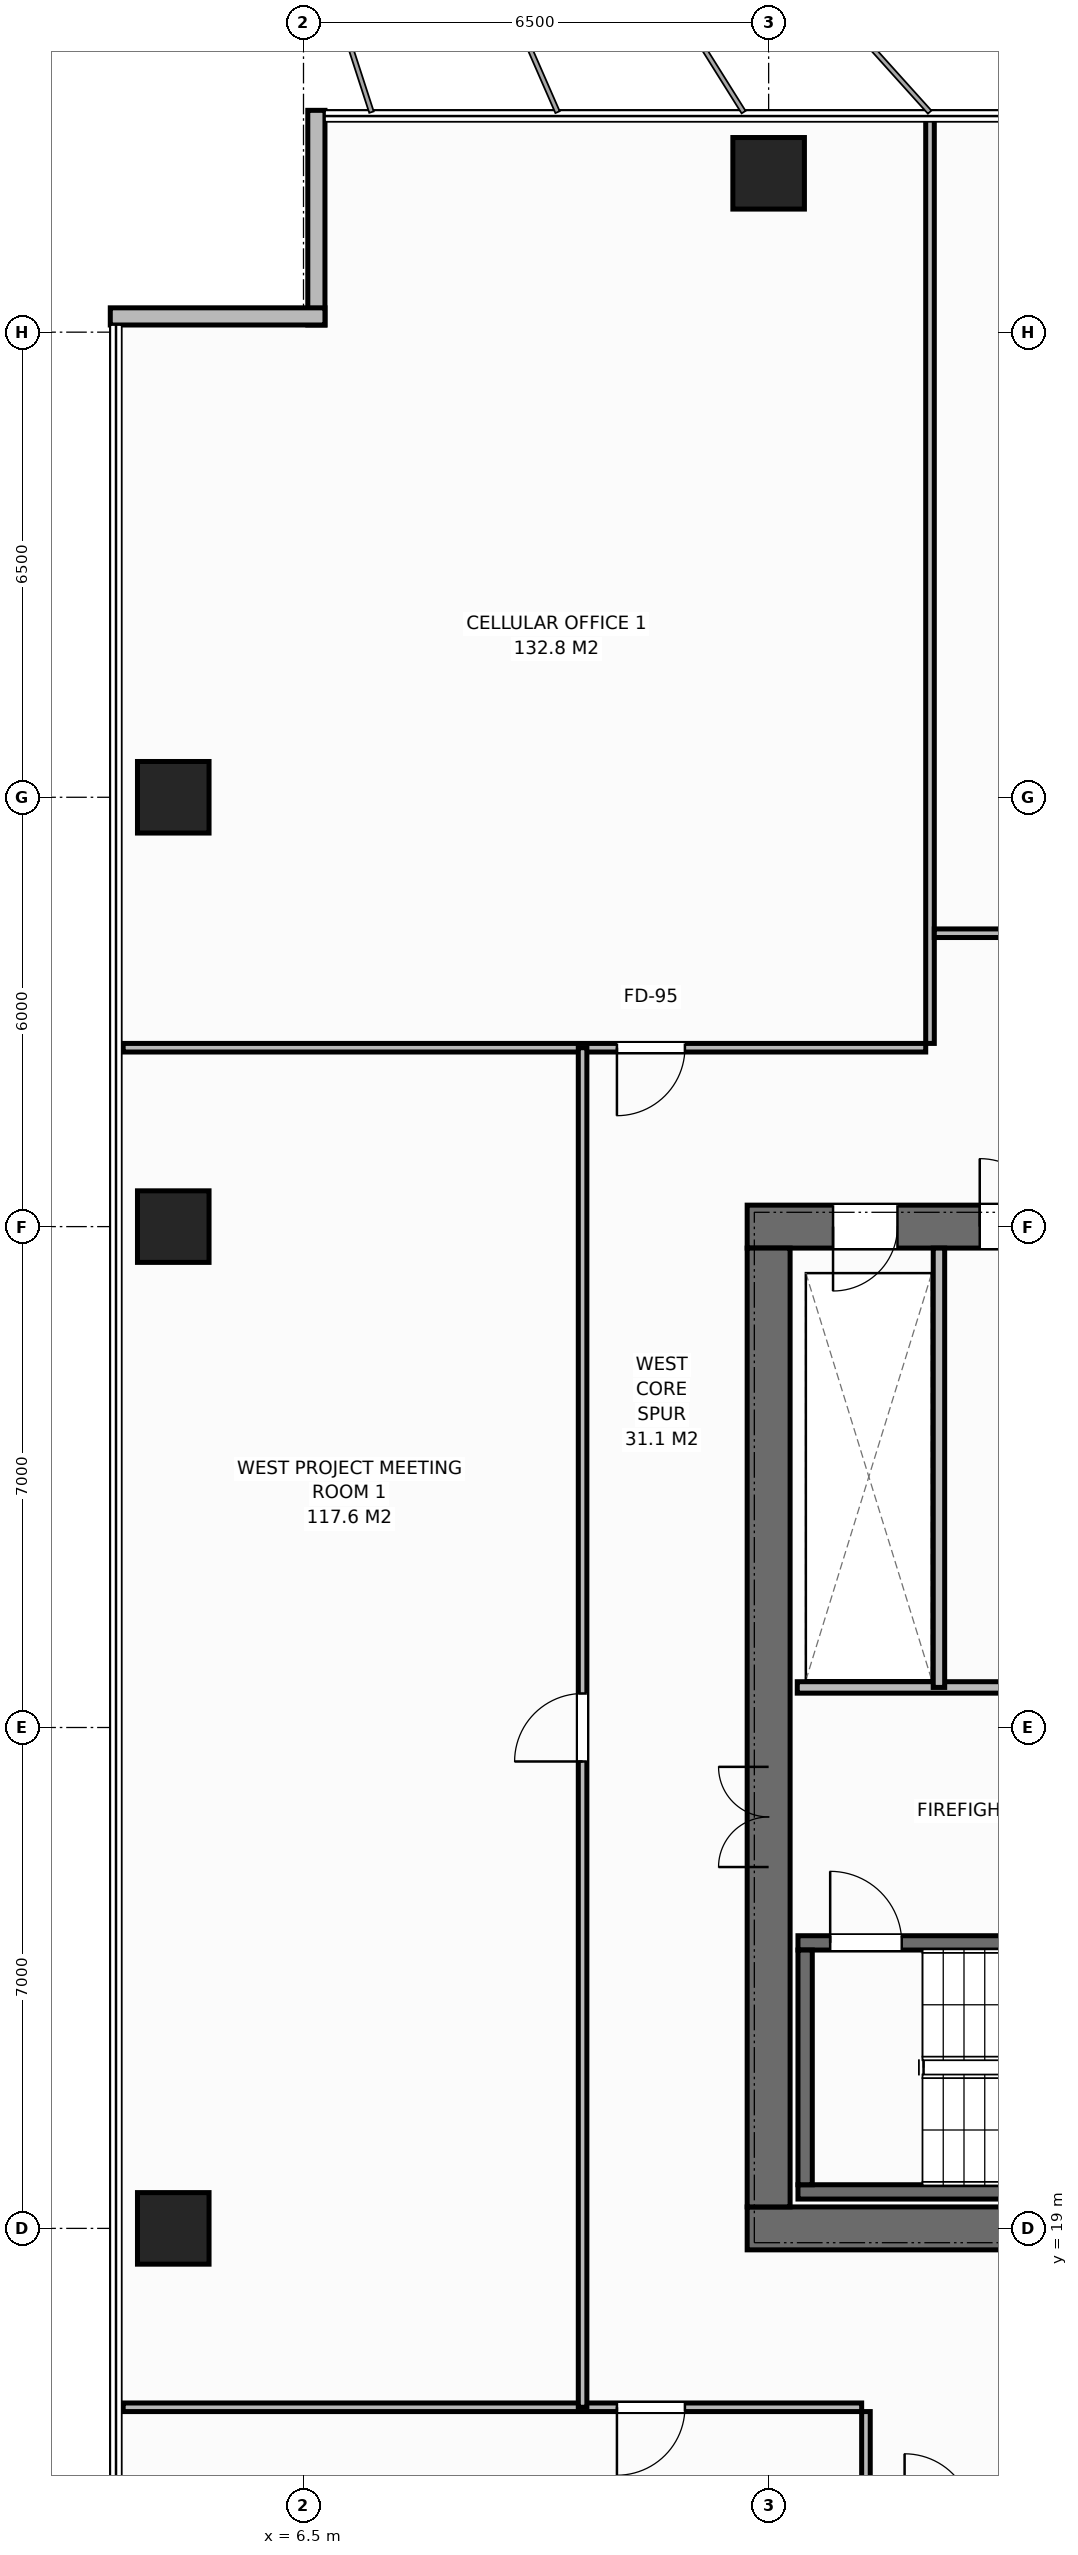
"""IFC4 building model, lengths in metres.
Left out: names, types, materials, properties, quantities, classifications, styles, units other than length and angle.
Written with IfcOpenShell. Run it as: python <this file> out.ifc"""

import sys

from ifc_helpers import new_model, si_unit, direction, frame, frame_2d, origin, origin_2d, place, context, subcontext, project, spatial, rectangle, extrude, element, fill, save


model = new_model("IFC4")
c1 = context("Model", 3, precision=1e-05, world=origin(), true_north=direction((0.0, 1.0)))
c2 = subcontext(c1, "Body", "Model", "MODEL_VIEW")
j1 = project(units=[si_unit("LENGTHUNIT", "METRE"), si_unit("PLANEANGLEUNIT", "RADIAN")], contexts=[c1])
p1 = place(None, origin())
s1 = spatial("IfcSite", under=j1, at=p1, CompositionType="ELEMENT")
p2 = place(p1, origin())
s2 = spatial("IfcBuilding", under=s1, at=p2, CompositionType="ELEMENT")
p3 = place(p2, frame((0.0, 0.0, 170.8)))
s3 = spatial("IfcBuildingStorey", under=s2, at=p3, CompositionType="ELEMENT", Elevation=170.8)
p4 = place(p3, frame((12.7, 19.0, 0.0), z_axis=(0.0, 0.0, 1.0), x_axis=(1.0, 0.0, 0.0)))
e1 = element("IfcWall", 1, at=p4, inside=s3, PredefinedType="SHEAR", context=c2, shape_type="SweptSolid", body=[
    extrude(rectangle(XDim=13.6, YDim=0.6, at=frame_2d((6.8, 0.0))), origin(), (0.0, 0.0, 1.0), 3.8),
])
p5 = place(p4, frame((9.18, 0.0, 0.0)))
e2 = element("IfcOpeningElement", 2, at=p5, cuts=e1, PredefinedType="OPENING", context=c2, shape_type="SweptSolid", body=[
    extrude(rectangle(XDim=1.4, YDim=2.2, at=frame_2d((0.7, 1.1))), frame((0.0, 0.31, 0.0), z_axis=(0.0, -1.0, 0.0), x_axis=(1.0, 0.0, 0.0)), (0.0, 0.0, 1.0), 0.62),
])
p6 = place(p3, frame((12.7, 33.0, 0.0), z_axis=(0.0, 0.0, 1.0), x_axis=(1.0, 0.0, 0.0)))
e3 = element("IfcWall", 3, at=p6, inside=s3, PredefinedType="SHEAR", context=c2, shape_type="SweptSolid", body=[
    extrude(rectangle(XDim=13.6, YDim=0.6, at=frame_2d((6.8, 0.0))), origin(), (0.0, 0.0, 1.0), 3.8),
])
p7 = place(p6, frame((1.2, 0.0, 0.0)))
e4 = element("IfcOpeningElement", 4, at=p7, cuts=e3, PredefinedType="OPENING", context=c2, shape_type="SweptSolid", body=[
    extrude(rectangle(XDim=0.9, YDim=2.15, at=frame_2d((0.45, 1.075))), frame((0.0, 0.31, 0.0), z_axis=(0.0, -1.0, 0.0), x_axis=(1.0, 0.0, 0.0)), (0.0, 0.0, 1.0), 0.62),
])
p8 = place(p6, frame((3.25, 0.0, 0.0)))
e5 = element("IfcOpeningElement", 5, at=p8, cuts=e3, PredefinedType="OPENING", context=c2, shape_type="SweptSolid", body=[
    extrude(rectangle(XDim=0.95, YDim=2.15, at=frame_2d((0.475, 1.075))), frame((0.0, 0.31, 0.0), z_axis=(0.0, -1.0, 0.0), x_axis=(1.0, 0.0, 0.0)), (0.0, 0.0, 1.0), 0.62),
])
p9 = place(p6, frame((6.1, 0.0, 0.0)))
e6 = element("IfcOpeningElement", 6, at=p9, cuts=e3, PredefinedType="OPENING", context=c2, shape_type="SweptSolid", body=[
    extrude(rectangle(XDim=0.95, YDim=2.15, at=frame_2d((0.475, 1.075))), frame((0.0, 0.31, 0.0), z_axis=(0.0, -1.0, 0.0), x_axis=(1.0, 0.0, 0.0)), (0.0, 0.0, 1.0), 0.62),
])
p10 = place(p6, frame((9.18, 0.0, 0.0)))
e7 = element("IfcOpeningElement", 7, at=p10, cuts=e3, PredefinedType="OPENING", context=c2, shape_type="SweptSolid", body=[
    extrude(rectangle(XDim=1.4, YDim=2.2, at=frame_2d((0.7, 1.1))), frame((0.0, 0.31, 0.0), z_axis=(0.0, -1.0, 0.0), x_axis=(1.0, 0.0, 0.0)), (0.0, 0.0, 1.0), 0.62),
])
p11 = place(p3, frame((13.0, 19.3, 0.0), z_axis=(0.0, 0.0, 1.0), x_axis=(0.0, 1.0, 0.0)))
e8 = element("IfcWall", 8, at=p11, inside=s3, PredefinedType="SHEAR", context=c2, shape_type="SweptSolid", body=[
    extrude(rectangle(XDim=13.4, YDim=0.6, at=frame_2d((6.7, 0.0))), origin(), (0.0, 0.0, 1.0), 3.8),
])
p12 = place(p11, frame((4.75, 0.0, 0.0)))
e9 = element("IfcOpeningElement", 9, at=p12, cuts=e8, PredefinedType="OPENING", context=c2, shape_type="SweptSolid", body=[
    extrude(rectangle(XDim=1.4, YDim=2.2, at=frame_2d((0.7, 1.1))), frame((0.0, 0.31, 0.0), z_axis=(0.0, -1.0, 0.0), x_axis=(1.0, 0.0, 0.0)), (0.0, 0.0, 1.0), 0.62),
])
p13 = place(p3, frame((13.41, 19.51, 0.0), z_axis=(0.0, 0.0, 1.0), x_axis=(1.0, 0.0, 0.0)))
e10 = element("IfcWall", 10, at=p13, inside=s3, PredefinedType="SHEAR", context=c2, shape_type="SweptSolid", body=[
    extrude(rectangle(XDim=8.43, YDim=0.2, at=frame_2d((4.215, 0.0))), origin(), (0.0, 0.0, 1.0), 3.8),
])
p14 = place(p3, frame((13.41, 22.99, 0.0), z_axis=(0.0, 0.0, 1.0), x_axis=(1.0, 0.0, 0.0)))
e11 = element("IfcWall", 11, at=p14, inside=s3, PredefinedType="SHEAR", context=c2, shape_type="SweptSolid", body=[
    extrude(rectangle(XDim=8.43, YDim=0.2, at=frame_2d((4.215, 0.0))), origin(), (0.0, 0.0, 1.0), 3.8),
])
p15 = place(p14, frame((0.45, 0.0, 0.0)))
e12 = element("IfcOpeningElement", 12, at=p15, cuts=e11, PredefinedType="OPENING", context=c2, shape_type="SweptSolid", body=[
    extrude(rectangle(XDim=1.0, YDim=2.15, at=frame_2d((0.5, 1.075))), frame((0.0, 0.11, 0.0), z_axis=(0.0, -1.0, 0.0), x_axis=(1.0, 0.0, 0.0)), (0.0, 0.0, 1.0), 0.22),
])
p16 = place(p3, frame((13.51, 19.61, 0.0), z_axis=(0.0, 0.0, 1.0), x_axis=(0.0, 1.0, 0.0)))
e13 = element("IfcWall", 13, at=p16, inside=s3, PredefinedType="SHEAR", context=c2, shape_type="SweptSolid", body=[
    extrude(rectangle(XDim=3.28, YDim=0.2, at=frame_2d((1.64, 0.0))), origin(), (0.0, 0.0, 1.0), 3.8),
])
for number, where, z_axis, x_axis in (
    (14, (13.0, 47.72, 0.0), (0.0, 0.0, 1.0), (1.0, 0.0, 0.0)),
    (15, (4.68, 19.0, 0.0), (0.0, 0.0, 1.0), (1.0, 0.0, 0.0)),
    (16, (4.68, 33.0, 0.0), (0.0, 0.0, 1.0), (1.0, 0.0, 0.0)),
    (17, (4.68, 39.0, 0.0), (0.0, 0.0, 1.0), (1.0, 0.0, 0.0)),
):
    element("IfcColumn", number, at=place(p3, frame(where, z_axis=z_axis, x_axis=x_axis)), inside=s3, PredefinedType="COLUMN", context=c2, shape_type="SweptSolid", body=[
        extrude(rectangle(XDim=1.0, YDim=1.0, at=origin_2d()), origin(), (0.0, 0.0, 1.0), 3.8),
    ])
for number, where, z_axis, x_axis in (
    (18, (6.68, 45.6, 0.0), (0.0, 0.0, 1.0), (0.0, 1.0, 0.0)),
    (19, (3.8, 45.72, 0.0), (0.0, 0.0, 1.0), (1.0, 0.0, 0.0)),
):
    element("IfcWall", number, at=place(p3, frame(where, z_axis=z_axis, x_axis=x_axis)), inside=s3, PredefinedType="STANDARD", context=c2, shape_type="SweptSolid", body=[
        extrude(rectangle(XDim=3.0, YDim=0.24, at=frame_2d((1.5, 0.0))), origin(), (0.0, 0.0, 1.0), 3.572),
    ])
p17 = place(p3, frame((13.4, 26.56, 0.0), z_axis=(0.0, 0.0, 1.0), x_axis=(1.0, 0.0, 0.0)))
e20 = element("IfcWall", 20, at=p17, inside=s3, PredefinedType="STANDARD", context=c2, shape_type="SweptSolid", body=[
    extrude(rectangle(XDim=8.34, YDim=0.16, at=frame_2d((4.17, 0.0))), origin(), (0.0, 0.0, 1.0), 3.572),
])
p18 = place(p3, frame((15.38, 26.56, 0.0), z_axis=(0.0, 0.0, 1.0), x_axis=(0.0, 1.0, 0.0)))
e21 = element("IfcWall", 21, at=p18, inside=s3, PredefinedType="STANDARD", context=c2, shape_type="SweptSolid", body=[
    extrude(rectangle(XDim=6.14, YDim=0.16, at=frame_2d((3.07, 0.0))), origin(), (0.0, 0.0, 1.0), 3.572),
])
p19 = place(p3, frame((15.255, 35.56, 0.0), z_axis=(0.0, 0.0, 1.0), x_axis=(0.0, 1.0, 0.0)))
e22 = element("IfcWall", 22, at=p19, inside=s3, PredefinedType="PARTITIONING", context=c2, shape_type="SweptSolid", body=[
    extrude(rectangle(XDim=13.02, YDim=0.12, at=frame_2d((6.51, 0.0))), origin(), (0.0, 0.0, 1.0), 3.572),
])
p20 = place(p3, frame((3.98, 35.5, 0.0), z_axis=(0.0, 0.0, 1.0), x_axis=(1.0, 0.0, 0.0)))
e23 = element("IfcWall", 23, at=p20, inside=s3, PredefinedType="PARTITIONING", context=c2, shape_type="SweptSolid", body=[
    extrude(rectangle(XDim=11.215, YDim=0.12, at=frame_2d((5.607, 0.0))), origin(), (0.0, 0.0, 1.0), 3.572),
])
p21 = place(p20, frame((6.9, 0.0, 0.0)))
e24 = element("IfcOpeningElement", 24, at=p21, cuts=e23, PredefinedType="OPENING", context=c2, shape_type="SweptSolid", body=[
    extrude(rectangle(XDim=0.95, YDim=2.15, at=frame_2d((0.475, 1.075))), frame((0.0, 0.07, 0.0), z_axis=(0.0, -1.0, 0.0), x_axis=(1.0, 0.0, 0.0)), (0.0, 0.0, 1.0), 0.14),
])
p22 = place(p3, frame((15.315, 37.1, 0.0), z_axis=(0.0, 0.0, 1.0), x_axis=(1.0, 0.0, 0.0)))
e25 = element("IfcWall", 25, at=p22, inside=s3, PredefinedType="PARTITIONING", context=c2, shape_type="SweptSolid", body=[
    extrude(rectangle(XDim=11.294, YDim=0.12, at=frame_2d((5.647, 0.0))), origin(), (0.0, 0.0, 1.0), 3.572),
])
p23 = place(p22, frame((5.172, 0.0, 0.0)))
e26 = element("IfcOpeningElement", 26, at=p23, cuts=e25, PredefinedType="OPENING", context=c2, shape_type="SweptSolid", body=[
    extrude(rectangle(XDim=0.95, YDim=2.15, at=frame_2d((0.475, 1.075))), frame((0.0, 0.07, 0.0), z_axis=(0.0, -1.0, 0.0), x_axis=(1.0, 0.0, 0.0)), (0.0, 0.0, 1.0), 0.14),
])
p24 = place(p3, frame((14.36, 3.42, 0.0), z_axis=(0.0, 0.0, 1.0), x_axis=(0.0, 1.0, 0.0)))
e27 = element("IfcWall", 27, at=p24, inside=s3, PredefinedType="PARTITIONING", context=c2, shape_type="SweptSolid", body=[
    extrude(rectangle(XDim=13.02, YDim=0.12, at=frame_2d((6.51, 0.0))), origin(), (0.0, 0.0, 1.0), 3.572),
])
p25 = place(p3, frame((3.98, 16.5, 0.0), z_axis=(0.0, 0.0, 1.0), x_axis=(1.0, 0.0, 0.0)))
e28 = element("IfcWall", 28, at=p25, inside=s3, PredefinedType="PARTITIONING", context=c2, shape_type="SweptSolid", body=[
    extrude(rectangle(XDim=10.32, YDim=0.12, at=frame_2d((5.16, 0.0))), origin(), (0.0, 0.0, 1.0), 3.572),
])
p26 = place(p25, frame((6.9, 0.0, 0.0)))
e29 = element("IfcOpeningElement", 29, at=p26, cuts=e28, PredefinedType="OPENING", context=c2, shape_type="SweptSolid", body=[
    extrude(rectangle(XDim=0.95, YDim=2.15, at=frame_2d((0.475, 1.075))), frame((0.0, 0.07, 0.0), z_axis=(0.0, -1.0, 0.0), x_axis=(1.0, 0.0, 0.0)), (0.0, 0.0, 1.0), 0.14),
])
p27 = place(p3, frame((10.4, 16.5, 0.0), z_axis=(0.0, 0.0, 1.0), x_axis=(0.0, 1.0, 0.0)))
e30 = element("IfcWall", 30, at=p27, inside=s3, PredefinedType="PARTITIONING", context=c2, shape_type="SweptSolid", body=[
    extrude(rectangle(XDim=19.0, YDim=0.12, at=frame_2d((9.5, 0.0))), origin(), (0.0, 0.0, 1.0), 3.572),
])
p28 = place(p27, frame((9.025, 0.0, 0.0)))
e31 = element("IfcOpeningElement", 31, at=p28, cuts=e30, PredefinedType="OPENING", context=c2, shape_type="SweptSolid", body=[
    extrude(rectangle(XDim=0.95, YDim=2.15, at=frame_2d((0.475, 1.075))), frame((0.0, 0.07, 0.0), z_axis=(0.0, -1.0, 0.0), x_axis=(1.0, 0.0, 0.0)), (0.0, 0.0, 1.0), 0.14),
])
p29 = place(p15, origin())
e32 = element("IfcDoor", 32, at=p29, inside=s3, OperationType="SINGLE_SWING_LEFT", PredefinedType="DOOR", context=c2, shape_type="SweptSolid", body=[
    extrude(rectangle(XDim=1.0, YDim=2.15, at=frame_2d((0.5, 1.075))), frame((0.0, 0.025, 0.0), z_axis=(0.0, -1.0, 0.0), x_axis=(1.0, 0.0, 0.0)), (0.0, 0.0, 1.0), 0.05),
])
fill(e12, e32)
p30 = place(p12, origin())
e33 = element("IfcDoor", 33, at=p30, inside=s3, OperationType="DOUBLE_DOOR_SINGLE_SWING", PredefinedType="DOOR", context=c2, shape_type="SweptSolid", body=[
    extrude(rectangle(XDim=1.4, YDim=2.2, at=frame_2d((0.7, 1.1))), frame((0.0, 0.025, 0.0), z_axis=(0.0, -1.0, 0.0), x_axis=(1.0, 0.0, 0.0)), (0.0, 0.0, 1.0), 0.05),
])
fill(e9, e33)
p31 = place(p7, origin())
e34 = element("IfcDoor", 34, at=p31, inside=s3, OperationType="SINGLE_SWING_RIGHT", PredefinedType="DOOR", context=c2, shape_type="SweptSolid", body=[
    extrude(rectangle(XDim=0.9, YDim=2.15, at=frame_2d((0.45, 1.075))), frame((0.0, -0.025, 0.0), z_axis=(0.0, -1.0, 0.0), x_axis=(1.0, 0.0, 0.0)), (0.0, 0.0, 1.0), 0.05),
])
fill(e4, e34)
p32 = place(p8, origin())
e35 = element("IfcDoor", 35, at=p32, inside=s3, OperationType="SINGLE_SWING_LEFT", PredefinedType="DOOR", context=c2, shape_type="SweptSolid", body=[
    extrude(rectangle(XDim=0.95, YDim=2.15, at=frame_2d((0.475, 1.075))), frame((0.0, -0.025, 0.0), z_axis=(0.0, -1.0, 0.0), x_axis=(1.0, 0.0, 0.0)), (0.0, 0.0, 1.0), 0.05),
])
fill(e5, e35)
p33 = place(p21, origin())
e36 = element("IfcDoor", 36, at=p33, inside=s3, OperationType="SINGLE_SWING_RIGHT", PredefinedType="DOOR", context=c2, shape_type="SweptSolid", body=[
    extrude(rectangle(XDim=0.95, YDim=2.15, at=frame_2d((0.475, 1.075))), frame((0.0, 0.025, 0.0), z_axis=(0.0, -1.0, 0.0), x_axis=(1.0, 0.0, 0.0)), (0.0, 0.0, 1.0), 0.05),
])
fill(e24, e36)
p34 = place(p26, origin())
e37 = element("IfcDoor", 37, at=p34, inside=s3, OperationType="SINGLE_SWING_RIGHT", PredefinedType="DOOR", context=c2, shape_type="SweptSolid", body=[
    extrude(rectangle(XDim=0.95, YDim=2.15, at=frame_2d((0.475, 1.075))), frame((0.0, 0.025, 0.0), z_axis=(0.0, -1.0, 0.0), x_axis=(1.0, 0.0, 0.0)), (0.0, 0.0, 1.0), 0.05),
])
fill(e29, e37)
p35 = place(p28, origin())
e38 = element("IfcDoor", 38, at=p35, inside=s3, OperationType="SINGLE_SWING_LEFT", PredefinedType="DOOR", context=c2, shape_type="SweptSolid", body=[
    extrude(rectangle(XDim=0.95, YDim=2.15, at=frame_2d((0.475, 1.075))), frame((0.0, 0.025, 0.0), z_axis=(0.0, -1.0, 0.0), x_axis=(1.0, 0.0, 0.0)), (0.0, 0.0, 1.0), 0.05),
])
fill(e31, e38)
save(model, sys.argv[1])
